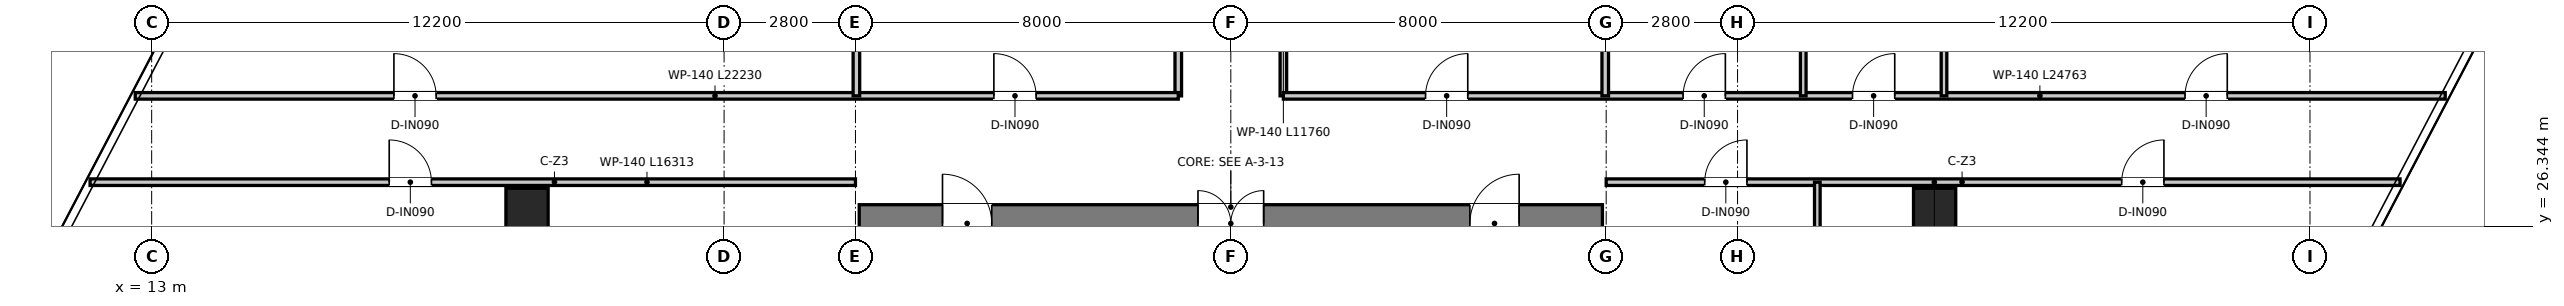
"""IFC4 building model, lengths in metres.
Left out: names, types, materials, properties, quantities, classifications, styles, units other than length and angle.
Written with IfcOpenShell. Run it as: python <this file> out.ifc"""

import sys

from ifc_helpers import new_model, si_unit, direction, frame, frame_2d, origin, origin_2d, place, context, subcontext, project, spatial, rectangle, extrude, source, transform, mapped, element, fill, save


model = new_model("IFC4")
c1 = context("Model", 3, precision=1e-05, world=origin(), true_north=direction((0.0, 1.0)))
c2 = subcontext(c1, "Body", "Model", "MODEL_VIEW")
j1 = project(units=[si_unit("LENGTHUNIT", "METRE"), si_unit("PLANEANGLEUNIT", "RADIAN")], contexts=[c1])
p1 = place(None, origin())
s1 = spatial("IfcSite", under=j1, at=p1, CompositionType="ELEMENT")
p2 = place(p1, origin())
s2 = spatial("IfcBuilding", under=s1, at=p2, CompositionType="ELEMENT")
p3 = place(p2, frame((0.0, 0.0, 150.15)))
s3 = spatial("IfcBuildingStorey", under=s2, at=p3, CompositionType="ELEMENT", Elevation=150.15)
p4 = place(p3, frame((28.08, 26.4, 0.0), z_axis=(0.0, 0.0, 1.0), x_axis=(1.0, 0.0, 0.0)))
e1 = element("IfcWall", 1, at=p4, inside=s3, PredefinedType="SHEAR", context=c2, shape_type="SweptSolid", body=[
    extrude(rectangle(XDim=15.84, YDim=0.8, at=frame_2d((7.92, 0.0))), origin(), (0.0, 0.0, 1.0), 3.95),
])
p5 = place(p4, frame((7.22, 0.0, 0.0)))
e2 = element("IfcOpeningElement", 2, at=p5, cuts=e1, PredefinedType="OPENING", context=c2, shape_type="SweptSolid", body=[
    extrude(rectangle(XDim=1.4, YDim=2.2, at=frame_2d((0.7, 1.1))), frame((0.0, 0.41, 0.0), z_axis=(0.0, -1.0, 0.0), x_axis=(1.0, 0.0, 0.0)), (0.0, 0.0, 1.0), 0.82),
])
p6 = place(p4, frame((1.775, 0.0, 0.0)))
e3 = element("IfcOpeningElement", 3, at=p6, cuts=e1, PredefinedType="OPENING", context=c2, shape_type="SweptSolid", body=[
    extrude(rectangle(XDim=1.05, YDim=2.1, at=frame_2d((0.525, 1.05))), frame((0.0, 0.41, 0.0), z_axis=(0.0, -1.0, 0.0), x_axis=(1.0, 0.0, 0.0)), (0.0, 0.0, 1.0), 0.82),
])
p7 = place(p4, frame((13.015, 0.0, 0.0)))
e4 = element("IfcOpeningElement", 4, at=p7, cuts=e1, PredefinedType="OPENING", context=c2, shape_type="SweptSolid", body=[
    extrude(rectangle(XDim=1.05, YDim=2.1, at=frame_2d((0.525, 1.05))), frame((0.0, 0.41, 0.0), z_axis=(0.0, -1.0, 0.0), x_axis=(1.0, 0.0, 0.0)), (0.0, 0.0, 1.0), 0.82),
])
m1 = source(origin(), c2, "Body", "SweptSolid", [
    extrude(rectangle(XDim=0.9, YDim=0.9, at=origin_2d()), origin(), (0.0, 0.0, 1.0), 3.95),
])
for number, where, z_axis, x_axis in (
    (5, (21.0, 26.7, 0.0), (0.0, 0.0, 1.0), (1.0, 0.0, 0.0)),
    (6, (51.0, 26.7, 0.0), (0.0, 0.0, 1.0), (1.0, 0.0, 0.0)),
):
    element("IfcColumn", number, at=place(p3, frame(where, z_axis=z_axis, x_axis=x_axis)), inside=s3, PredefinedType="COLUMN", context=c2, shape_type="MappedRepresentation", body=[
        mapped(m1, transform((0.0, 0.0, 0.0), x_axis=(1.0, 0.0, 0.0), y_axis=(0.0, 1.0, 0.0), z_axis=(0.0, 0.0, 1.0), scale=1.0)),
    ])
p8 = place(p3, frame((34.88, 29.12, 0.0), z_axis=(0.0, 0.0, 1.0), x_axis=(0.0, 1.0, 0.0)))
e7 = element("IfcWall", 7, at=p8, inside=s3, PredefinedType="PARTITIONING", context=c2, shape_type="SweptSolid", body=[
    extrude(rectangle(XDim=11.76, YDim=0.14, at=frame_2d((5.88, 0.0))), origin(), (0.0, 0.0, 1.0), 3.03),
])
p9 = place(p8, frame((3.205, 0.0, 0.0)))
e8 = element("IfcOpeningElement", 8, at=p9, cuts=e7, PredefinedType="OPENING", context=c2, shape_type="SweptSolid", body=[
    extrude(rectangle(XDim=0.95, YDim=2.1, at=frame_2d((0.475, 1.05))), frame((0.0, 0.08, 0.0), z_axis=(0.0, -1.0, 0.0), x_axis=(1.0, 0.0, 0.0)), (0.0, 0.0, 1.0), 0.16),
])
p10 = place(p8, frame((8.02, 0.0, 0.0)))
e9 = element("IfcOpeningElement", 9, at=p10, cuts=e7, PredefinedType="OPENING", context=c2, shape_type="SweptSolid", body=[
    extrude(rectangle(XDim=0.9, YDim=2.1, at=frame_2d((0.45, 1.05))), frame((0.0, 0.08, 0.0), z_axis=(0.0, -1.0, 0.0), x_axis=(1.0, 0.0, 0.0)), (0.0, 0.0, 1.0), 0.16),
])
p11 = place(p3, frame((37.12, 29.12, 0.0), z_axis=(0.0, 0.0, 1.0), x_axis=(0.0, 1.0, 0.0)))
e10 = element("IfcWall", 10, at=p11, inside=s3, PredefinedType="PARTITIONING", context=c2, shape_type="SweptSolid", body=[
    extrude(rectangle(XDim=11.76, YDim=0.14, at=frame_2d((5.88, 0.0))), origin(), (0.0, 0.0, 1.0), 3.03),
])
p12 = place(p11, frame((4.085, 0.0, 0.0)))
e11 = element("IfcOpeningElement", 11, at=p12, cuts=e10, PredefinedType="OPENING", context=c2, shape_type="SweptSolid", body=[
    extrude(rectangle(XDim=0.95, YDim=2.1, at=frame_2d((0.475, 1.05))), frame((0.0, 0.08, 0.0), z_axis=(0.0, -1.0, 0.0), x_axis=(1.0, 0.0, 0.0)), (0.0, 0.0, 1.0), 0.16),
])
p13 = place(p11, frame((8.02, 0.0, 0.0)))
e12 = element("IfcOpeningElement", 12, at=p13, cuts=e10, PredefinedType="OPENING", context=c2, shape_type="SweptSolid", body=[
    extrude(rectangle(XDim=0.9, YDim=2.1, at=frame_2d((0.45, 1.05))), frame((0.0, 0.08, 0.0), z_axis=(0.0, -1.0, 0.0), x_axis=(1.0, 0.0, 0.0)), (0.0, 0.0, 1.0), 0.16),
])
p14 = place(p3, frame((12.65, 29.12, 0.0), z_axis=(0.0, 0.0, 1.0), x_axis=(1.0, 0.0, 0.0)))
e13 = element("IfcWall", 13, at=p14, inside=s3, PredefinedType="PARTITIONING", context=c2, shape_type="SweptSolid", body=[
    extrude(rectangle(XDim=22.229, YDim=0.14, at=frame_2d((11.115, 0.0))), origin(), (0.0, 0.0, 1.0), 3.03),
])
p15 = place(p14, frame((18.3, 0.0, 0.0)))
e14 = element("IfcOpeningElement", 14, at=p15, cuts=e13, PredefinedType="OPENING", context=c2, shape_type="SweptSolid", body=[
    extrude(rectangle(XDim=0.9, YDim=2.1, at=frame_2d((0.45, 1.05))), frame((0.0, 0.08, 0.0), z_axis=(0.0, -1.0, 0.0), x_axis=(1.0, 0.0, 0.0)), (0.0, 0.0, 1.0), 0.16),
])
p16 = place(p14, frame((5.513, 0.0, 0.0)))
e15 = element("IfcOpeningElement", 15, at=p16, cuts=e13, PredefinedType="OPENING", context=c2, shape_type="SweptSolid", body=[
    extrude(rectangle(XDim=0.9, YDim=2.1, at=frame_2d((0.45, 1.05))), frame((0.0, 0.08, 0.0), z_axis=(0.0, -1.0, 0.0), x_axis=(1.0, 0.0, 0.0)), (0.0, 0.0, 1.0), 0.16),
])
p17 = place(p3, frame((37.12, 29.12, 0.0), z_axis=(0.0, 0.0, 1.0), x_axis=(1.0, 0.0, 0.0)))
e16 = element("IfcWall", 16, at=p17, inside=s3, PredefinedType="PARTITIONING", context=c2, shape_type="SweptSolid", body=[
    extrude(rectangle(XDim=24.763, YDim=0.14, at=frame_2d((12.381, 0.0))), origin(), (0.0, 0.0, 1.0), 3.03),
])
p18 = place(p17, frame((3.03, 0.0, 0.0)))
e17 = element("IfcOpeningElement", 17, at=p18, cuts=e16, PredefinedType="OPENING", context=c2, shape_type="SweptSolid", body=[
    extrude(rectangle(XDim=0.9, YDim=2.1, at=frame_2d((0.45, 1.05))), frame((0.0, 0.08, 0.0), z_axis=(0.0, -1.0, 0.0), x_axis=(1.0, 0.0, 0.0)), (0.0, 0.0, 1.0), 0.16),
])
p19 = place(p17, frame((8.52, 0.0, 0.0)))
e18 = element("IfcOpeningElement", 18, at=p19, cuts=e16, PredefinedType="OPENING", context=c2, shape_type="SweptSolid", body=[
    extrude(rectangle(XDim=0.9, YDim=2.1, at=frame_2d((0.45, 1.05))), frame((0.0, 0.08, 0.0), z_axis=(0.0, -1.0, 0.0), x_axis=(1.0, 0.0, 0.0)), (0.0, 0.0, 1.0), 0.16),
])
p20 = place(p17, frame((12.13, 0.0, 0.0)))
e19 = element("IfcOpeningElement", 19, at=p20, cuts=e16, PredefinedType="OPENING", context=c2, shape_type="SweptSolid", body=[
    extrude(rectangle(XDim=0.9, YDim=2.1, at=frame_2d((0.45, 1.05))), frame((0.0, 0.08, 0.0), z_axis=(0.0, -1.0, 0.0), x_axis=(1.0, 0.0, 0.0)), (0.0, 0.0, 1.0), 0.16),
])
p21 = place(p17, frame((19.217, 0.0, 0.0)))
e20 = element("IfcOpeningElement", 20, at=p21, cuts=e16, PredefinedType="OPENING", context=c2, shape_type="SweptSolid", body=[
    extrude(rectangle(XDim=0.9, YDim=2.1, at=frame_2d((0.45, 1.05))), frame((0.0, 0.08, 0.0), z_axis=(0.0, -1.0, 0.0), x_axis=(1.0, 0.0, 0.0)), (0.0, 0.0, 1.0), 0.16),
])
p22 = place(p3, frame((11.687, 27.28, 0.0), z_axis=(0.0, 0.0, 1.0), x_axis=(1.0, 0.0, 0.0)))
e21 = element("IfcWall", 21, at=p22, inside=s3, PredefinedType="PARTITIONING", context=c2, shape_type="SweptSolid", body=[
    extrude(rectangle(XDim=16.313, YDim=0.14, at=frame_2d((8.156, 0.0))), origin(), (0.0, 0.0, 1.0), 3.03),
])
p23 = place(p22, frame((6.376, 0.0, 0.0)))
e22 = element("IfcOpeningElement", 22, at=p23, cuts=e21, PredefinedType="OPENING", context=c2, shape_type="SweptSolid", body=[
    extrude(rectangle(XDim=0.9, YDim=2.1, at=frame_2d((0.45, 1.05))), frame((0.0, 0.08, 0.0), z_axis=(0.0, -1.0, 0.0), x_axis=(1.0, 0.0, 0.0)), (0.0, 0.0, 1.0), 0.16),
])
p24 = place(p3, frame((44.0, 27.28, 0.0), z_axis=(0.0, 0.0, 1.0), x_axis=(1.0, 0.0, 0.0)))
e23 = element("IfcWall", 23, at=p24, inside=s3, PredefinedType="PARTITIONING", context=c2, shape_type="SweptSolid", body=[
    extrude(rectangle(XDim=16.92, YDim=0.14, at=frame_2d((8.46, 0.0))), origin(), (0.0, 0.0, 1.0), 3.03),
])
p25 = place(p24, frame((2.1, 0.0, 0.0)))
e24 = element("IfcOpeningElement", 24, at=p25, cuts=e23, PredefinedType="OPENING", context=c2, shape_type="SweptSolid", body=[
    extrude(rectangle(XDim=0.9, YDim=2.1, at=frame_2d((0.45, 1.05))), frame((0.0, 0.08, 0.0), z_axis=(0.0, -1.0, 0.0), x_axis=(1.0, 0.0, 0.0)), (0.0, 0.0, 1.0), 0.16),
])
p26 = place(p24, frame((10.987, 0.0, 0.0)))
e25 = element("IfcOpeningElement", 25, at=p26, cuts=e23, PredefinedType="OPENING", context=c2, shape_type="SweptSolid", body=[
    extrude(rectangle(XDim=0.9, YDim=2.1, at=frame_2d((0.45, 1.05))), frame((0.0, 0.08, 0.0), z_axis=(0.0, -1.0, 0.0), x_axis=(1.0, 0.0, 0.0)), (0.0, 0.0, 1.0), 0.16),
])
for number, where, z_axis, x_axis in (
    (26, (28.02, 29.12, 0.0), (0.0, 0.0, 1.0), (0.0, 1.0, 0.0)),
    (27, (43.98, 29.12, 0.0), (0.0, 0.0, 1.0), (0.0, 1.0, 0.0)),
):
    element("IfcWall", number, at=place(p3, frame(where, z_axis=z_axis, x_axis=x_axis)), inside=s3, PredefinedType="PARTITIONING", context=c2, shape_type="SweptSolid", body=[
        extrude(rectangle(XDim=5.46, YDim=0.14, at=frame_2d((2.73, 0.0))), origin(), (0.0, 0.0, 1.0), 3.31),
    ])
p27 = place(p3, frame((48.2, 29.12, 0.0), z_axis=(0.0, 0.0, 1.0), x_axis=(0.0, 1.0, 0.0)))
e28 = element("IfcWall", 28, at=p27, inside=s3, PredefinedType="PARTITIONING", context=c2, shape_type="SweptSolid", body=[
    extrude(rectangle(XDim=15.811, YDim=0.12, at=frame_2d((7.906, 0.0))), origin(), (0.0, 0.0, 1.0), 3.08),
])
p28 = place(p3, frame((51.2, 29.12, 0.0), z_axis=(0.0, 0.0, 1.0), x_axis=(0.0, 1.0, 0.0)))
e29 = element("IfcWall", 29, at=p28, inside=s3, PredefinedType="PARTITIONING", context=c2, shape_type="SweptSolid", body=[
    extrude(rectangle(XDim=14.241, YDim=0.12, at=frame_2d((7.121, 0.0))), origin(), (0.0, 0.0, 1.0), 3.28),
])
p29 = place(p3, frame((48.5, 3.548, 0.0), z_axis=(0.0, 0.0, 1.0), x_axis=(0.0, 1.0, 0.0)))
e30 = element("IfcWall", 30, at=p29, inside=s3, PredefinedType="PARTITIONING", context=c2, shape_type="SweptSolid", body=[
    extrude(rectangle(XDim=23.732, YDim=0.12, at=frame_2d((11.866, 0.0))), origin(), (0.0, 0.0, 1.0), 3.08),
])
p30 = place(p5, origin())
e31 = element("IfcDoor", 31, at=p30, inside=s3, OperationType="DOUBLE_DOOR_SINGLE_SWING", PredefinedType="DOOR", context=c2, shape_type="SweptSolid", body=[
    extrude(rectangle(XDim=1.4, YDim=2.2, at=frame_2d((0.7, 1.1))), frame((0.0, 0.025, 0.0), z_axis=(0.0, -1.0, 0.0), x_axis=(1.0, 0.0, 0.0)), (0.0, 0.0, 1.0), 0.05),
])
fill(e2, e31)
p31 = place(p6, origin())
e32 = element("IfcDoor", 32, at=p31, inside=s3, OperationType="SINGLE_SWING_LEFT", PredefinedType="DOOR", context=c2, shape_type="SweptSolid", body=[
    extrude(rectangle(XDim=1.05, YDim=2.1, at=frame_2d((0.525, 1.05))), frame((0.0, 0.025, 0.0), z_axis=(0.0, -1.0, 0.0), x_axis=(1.0, 0.0, 0.0)), (0.0, 0.0, 1.0), 0.05),
])
fill(e3, e32)
p32 = place(p7, origin())
e33 = element("IfcDoor", 33, at=p32, inside=s3, OperationType="SINGLE_SWING_RIGHT", PredefinedType="DOOR", context=c2, shape_type="SweptSolid", body=[
    extrude(rectangle(XDim=1.05, YDim=2.1, at=frame_2d((0.525, 1.05))), frame((0.0, 0.025, 0.0), z_axis=(0.0, -1.0, 0.0), x_axis=(1.0, 0.0, 0.0)), (0.0, 0.0, 1.0), 0.05),
])
fill(e4, e33)
p33 = place(p15, origin())
e34 = element("IfcDoor", 34, at=p33, inside=s3, OperationType="SINGLE_SWING_LEFT", PredefinedType="DOOR", context=c2, shape_type="SweptSolid", body=[
    extrude(rectangle(XDim=0.9, YDim=2.1, at=frame_2d((0.45, 1.05))), frame((0.0, 0.025, 0.0), z_axis=(0.0, -1.0, 0.0), x_axis=(1.0, 0.0, 0.0)), (0.0, 0.0, 1.0), 0.05),
])
fill(e14, e34)
p34 = place(p18, origin())
e35 = element("IfcDoor", 35, at=p34, inside=s3, OperationType="SINGLE_SWING_RIGHT", PredefinedType="DOOR", context=c2, shape_type="SweptSolid", body=[
    extrude(rectangle(XDim=0.9, YDim=2.1, at=frame_2d((0.45, 1.05))), frame((0.0, 0.025, 0.0), z_axis=(0.0, -1.0, 0.0), x_axis=(1.0, 0.0, 0.0)), (0.0, 0.0, 1.0), 0.05),
])
fill(e17, e35)
p35 = place(p16, origin())
e36 = element("IfcDoor", 36, at=p35, inside=s3, OperationType="SINGLE_SWING_LEFT", PredefinedType="DOOR", context=c2, shape_type="SweptSolid", body=[
    extrude(rectangle(XDim=0.9, YDim=2.1, at=frame_2d((0.45, 1.05))), frame((0.0, 0.025, 0.0), z_axis=(0.0, -1.0, 0.0), x_axis=(1.0, 0.0, 0.0)), (0.0, 0.0, 1.0), 0.05),
])
fill(e15, e36)
p36 = place(p19, origin())
e37 = element("IfcDoor", 37, at=p36, inside=s3, OperationType="SINGLE_SWING_RIGHT", PredefinedType="DOOR", context=c2, shape_type="SweptSolid", body=[
    extrude(rectangle(XDim=0.9, YDim=2.1, at=frame_2d((0.45, 1.05))), frame((0.0, 0.025, 0.0), z_axis=(0.0, -1.0, 0.0), x_axis=(1.0, 0.0, 0.0)), (0.0, 0.0, 1.0), 0.05),
])
fill(e18, e37)
p37 = place(p20, origin())
e38 = element("IfcDoor", 38, at=p37, inside=s3, OperationType="SINGLE_SWING_RIGHT", PredefinedType="DOOR", context=c2, shape_type="SweptSolid", body=[
    extrude(rectangle(XDim=0.9, YDim=2.1, at=frame_2d((0.45, 1.05))), frame((0.0, 0.025, 0.0), z_axis=(0.0, -1.0, 0.0), x_axis=(1.0, 0.0, 0.0)), (0.0, 0.0, 1.0), 0.05),
])
fill(e19, e38)
p38 = place(p21, origin())
e39 = element("IfcDoor", 39, at=p38, inside=s3, OperationType="SINGLE_SWING_RIGHT", PredefinedType="DOOR", context=c2, shape_type="SweptSolid", body=[
    extrude(rectangle(XDim=0.9, YDim=2.1, at=frame_2d((0.45, 1.05))), frame((0.0, 0.025, 0.0), z_axis=(0.0, -1.0, 0.0), x_axis=(1.0, 0.0, 0.0)), (0.0, 0.0, 1.0), 0.05),
])
fill(e20, e39)
p39 = place(p23, origin())
e40 = element("IfcDoor", 40, at=p39, inside=s3, OperationType="SINGLE_SWING_LEFT", PredefinedType="DOOR", context=c2, shape_type="SweptSolid", body=[
    extrude(rectangle(XDim=0.9, YDim=2.1, at=frame_2d((0.45, 1.05))), frame((0.0, 0.025, 0.0), z_axis=(0.0, -1.0, 0.0), x_axis=(1.0, 0.0, 0.0)), (0.0, 0.0, 1.0), 0.05),
])
fill(e22, e40)
p40 = place(p25, origin())
e41 = element("IfcDoor", 41, at=p40, inside=s3, OperationType="SINGLE_SWING_RIGHT", PredefinedType="DOOR", context=c2, shape_type="SweptSolid", body=[
    extrude(rectangle(XDim=0.9, YDim=2.1, at=frame_2d((0.45, 1.05))), frame((0.0, 0.025, 0.0), z_axis=(0.0, -1.0, 0.0), x_axis=(1.0, 0.0, 0.0)), (0.0, 0.0, 1.0), 0.05),
])
fill(e24, e41)
p41 = place(p26, origin())
e42 = element("IfcDoor", 42, at=p41, inside=s3, OperationType="SINGLE_SWING_RIGHT", PredefinedType="DOOR", context=c2, shape_type="SweptSolid", body=[
    extrude(rectangle(XDim=0.9, YDim=2.1, at=frame_2d((0.45, 1.05))), frame((0.0, 0.025, 0.0), z_axis=(0.0, -1.0, 0.0), x_axis=(1.0, 0.0, 0.0)), (0.0, 0.0, 1.0), 0.05),
])
fill(e25, e42)
save(model, sys.argv[1])
